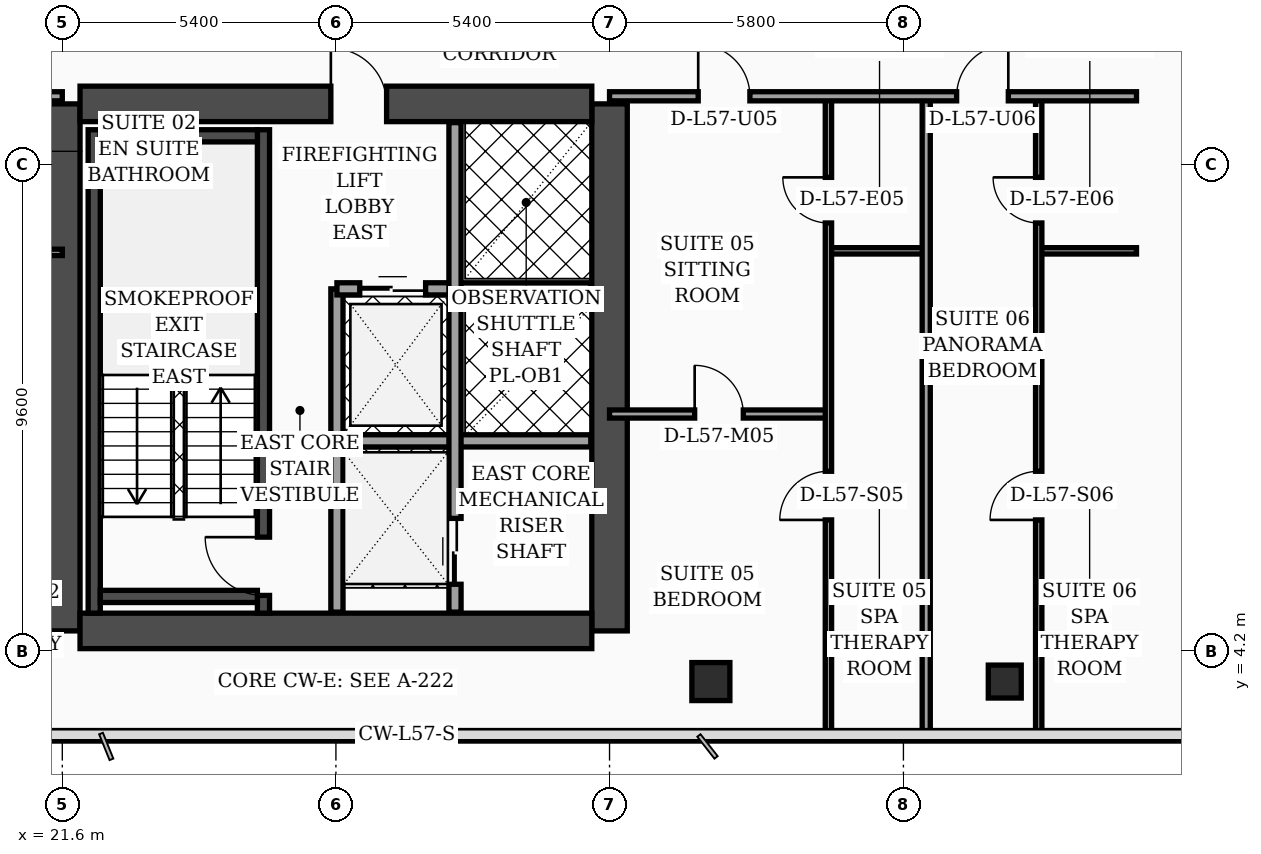
"""IFC4 building model, lengths in metres.
Left out: names, types, materials, properties, quantities, classifications, styles, units other than length and angle.
Written with IfcOpenShell. Run it as: python <this file> out.ifc"""

import sys

from ifc_helpers import new_model, si_unit, direction, frame, frame_2d, origin, origin_2d, place, context, subcontext, project, spatial, rectangle, hollow_rectangle, extrude, element, fill, save


model = new_model("IFC4")
c1 = context("Model", 3, precision=1e-05, world=origin(), true_north=direction((0.0, 1.0)))
c2 = subcontext(c1, "Body", "Model", "MODEL_VIEW")
j1 = project(units=[si_unit("LENGTHUNIT", "METRE"), si_unit("PLANEANGLEUNIT", "RADIAN")], contexts=[c1])
p1 = place(None, origin())
s1 = spatial("IfcSite", under=j1, at=p1, CompositionType="ELEMENT")
p2 = place(p1, origin())
s2 = spatial("IfcBuilding", under=s1, at=p2, CompositionType="ELEMENT")
p3 = place(p2, frame((0.0, 0.0, 230.7)))
s3 = spatial("IfcBuildingStorey", under=s2, at=p3, CompositionType="ELEMENT", Elevation=230.7)
for number, where, z_axis, x_axis in (
    (1, (21.6, 4.6, 0.0), (0.0, 0.0, 1.0), (0.0, 1.0, 0.0)),
    (2, (32.4, 4.6, 0.0), (0.0, 0.0, 1.0), (0.0, 1.0, 0.0)),
):
    element("IfcWall", number, at=place(p3, frame(where, z_axis=z_axis, x_axis=x_axis)), inside=s3, PredefinedType="SHEAR", context=c2, shape_type="SweptSolid", body=[
        extrude(rectangle(XDim=10.4, YDim=0.7, at=frame_2d((5.2, 0.0))), origin(), (0.0, 0.0, 1.0), 3.52),
    ])
p4 = place(p3, frame((21.95, 15.0, 0.0), z_axis=(0.0, 0.0, 1.0), x_axis=(1.0, 0.0, 0.0)))
e3 = element("IfcWall", 3, at=p4, inside=s3, PredefinedType="SHEAR", context=c2, shape_type="SweptSolid", body=[
    extrude(rectangle(XDim=10.1, YDim=0.7, at=frame_2d((5.05, 0.0))), origin(), (0.0, 0.0, 1.0), 3.52),
])
p5 = place(p4, frame((4.95, 0.0, 0.0)))
e4 = element("IfcOpeningElement", 4, at=p5, cuts=e3, PredefinedType="OPENING", context=c2, shape_type="SweptSolid", body=[
    extrude(rectangle(XDim=1.1, YDim=2.2, at=frame_2d((0.55, 1.1))), frame((0.0, 0.36, 0.0), z_axis=(0.0, -1.0, 0.0), x_axis=(1.0, 0.0, 0.0)), (0.0, 0.0, 1.0), 0.72),
])
p6 = place(p3, frame((21.95, 4.6, 0.0), z_axis=(0.0, 0.0, 1.0), x_axis=(1.0, 0.0, 0.0)))
e5 = element("IfcWall", 5, at=p6, inside=s3, PredefinedType="SHEAR", context=c2, shape_type="SweptSolid", body=[
    extrude(rectangle(XDim=10.1, YDim=0.7, at=frame_2d((5.05, 0.0))), origin(), (0.0, 0.0, 1.0), 3.52),
])
p7 = place(p3, frame((22.23, 4.95, 0.0), z_axis=(0.0, 0.0, 1.0), x_axis=(0.0, 1.0, 0.0)))
e6 = element("IfcWall", 6, at=p7, inside=s3, PredefinedType="SOLIDWALL", context=c2, shape_type="SweptSolid", body=[
    extrude(rectangle(XDim=9.54, YDim=0.24, at=frame_2d((4.77, 0.0))), origin(), (0.0, 0.0, 1.0), 3.52),
])
p8 = place(p3, frame((25.57, 4.95, 0.0), z_axis=(0.0, 0.0, 1.0), x_axis=(0.0, 1.0, 0.0)))
e7 = element("IfcWall", 7, at=p8, inside=s3, PredefinedType="SOLIDWALL", context=c2, shape_type="SweptSolid", body=[
    extrude(rectangle(XDim=9.54, YDim=0.24, at=frame_2d((4.77, 0.0))), origin(), (0.0, 0.0, 1.0), 3.52),
])
p9 = place(p8, frame((0.35, 0.0, 0.0)))
e8 = element("IfcOpeningElement", 8, at=p9, cuts=e7, PredefinedType="OPENING", context=c2, shape_type="SweptSolid", body=[
    extrude(rectangle(XDim=1.15, YDim=2.2, at=frame_2d((0.575, 1.1))), frame((0.0, 0.13, 0.0), z_axis=(0.0, -1.0, 0.0), x_axis=(1.0, 0.0, 0.0)), (0.0, 0.0, 1.0), 0.26),
])
for number, where, z_axis, x_axis in (
    (9, (22.35, 5.28, 0.0), (0.0, 0.0, 1.0), (1.0, 0.0, 0.0)),
    (10, (22.35, 14.37, 0.0), (0.0, 0.0, 1.0), (1.0, 0.0, 0.0)),
):
    element("IfcWall", number, at=place(p3, frame(where, z_axis=z_axis, x_axis=x_axis)), inside=s3, PredefinedType="SOLIDWALL", context=c2, shape_type="SweptSolid", body=[
        extrude(rectangle(XDim=3.1, YDim=0.24, at=frame_2d((1.55, 0.0))), origin(), (0.0, 0.0, 1.0), 3.52),
    ])
p10 = place(p3, frame((34.4, 3.6, 0.0), z_axis=(0.0, 0.0, 1.0), x_axis=(1.0, 0.0, 0.0)))
e11 = element("IfcColumn", 11, at=p10, inside=s3, PredefinedType="COLUMN", context=c2, shape_type="SweptSolid", body=[
    extrude(hollow_rectangle(XDim=0.75, YDim=0.75, WallThickness=0.032, at=origin_2d()), origin(), (0.0, 0.0, 1.0), 3.52),
])
p11 = place(p3, frame((40.2, 3.6, 0.0), z_axis=(0.0, 0.0, 1.0), x_axis=(1.0, 0.0, 0.0)))
e12 = element("IfcColumn", 12, at=p11, inside=s3, PredefinedType="COLUMN", context=c2, shape_type="SweptSolid", body=[
    extrude(hollow_rectangle(XDim=0.65, YDim=0.65, WallThickness=0.028, at=origin_2d()), origin(), (0.0, 0.0, 1.0), 3.52),
])
p12 = place(p3, frame((49.43, 5.505, 0.0), z_axis=(0.0, 0.0, 1.0), x_axis=(-0.300509063924, 0.953778958931, 0.0)))
e13 = element("IfcWall", 13, at=p12, inside=s3, PredefinedType="SOLIDWALL", context=c2, shape_type="SweptSolid", body=[
    extrude(rectangle(XDim=30.814, YDim=0.32, at=frame_2d((15.407, 0.0))), origin(), (0.0, 0.0, 1.0), 3.52),
])
p13 = place(p12, frame((18.796, 0.0, 0.0)))
e14 = element("IfcOpeningElement", 14, at=p13, cuts=e13, PredefinedType="OPENING", context=c2, shape_type="SweptSolid", body=[
    extrude(rectangle(XDim=1.4, YDim=2.25, at=frame_2d((0.7, 1.125))), frame((0.0, 0.17, 0.0), z_axis=(0.0, -1.0, 0.0), x_axis=(1.0, 0.0, 0.0)), (0.0, 0.0, 1.0), 0.34),
])
p14 = place(p12, frame((4.437, 0.0, 0.7)))
e15 = element("IfcOpeningElement", 15, at=p14, cuts=e13, PredefinedType="OPENING", context=c2, shape_type="SweptSolid", body=[
    extrude(rectangle(XDim=1.6, YDim=1.65, at=frame_2d((0.8, 0.825))), frame((0.0, 0.17, 0.0), z_axis=(0.0, -1.0, 0.0), x_axis=(1.0, 0.0, 0.0)), (0.0, 0.0, 1.0), 0.34),
])
p15 = place(p12, frame((9.889, 0.0, 0.7)))
e16 = element("IfcOpeningElement", 16, at=p15, cuts=e13, PredefinedType="OPENING", context=c2, shape_type="SweptSolid", body=[
    extrude(rectangle(XDim=1.6, YDim=1.65, at=frame_2d((0.8, 0.825))), frame((0.0, 0.17, 0.0), z_axis=(0.0, -1.0, 0.0), x_axis=(1.0, 0.0, 0.0)), (0.0, 0.0, 1.0), 0.34),
])
p16 = place(p12, frame((1.6, 0.0, 0.75)))
e17 = element("IfcOpeningElement", 17, at=p16, cuts=e13, PredefinedType="OPENING", context=c2, shape_type="SweptSolid", body=[
    extrude(rectangle(XDim=1.5, YDim=1.6, at=frame_2d((0.75, 0.8))), frame((0.0, 0.17, 0.0), z_axis=(0.0, -1.0, 0.0), x_axis=(1.0, 0.0, 0.0)), (0.0, 0.0, 1.0), 0.34),
])
p17 = place(p12, frame((7.8, 0.0, 0.75)))
e18 = element("IfcOpeningElement", 18, at=p17, cuts=e13, PredefinedType="OPENING", context=c2, shape_type="SweptSolid", body=[
    extrude(rectangle(XDim=1.5, YDim=1.6, at=frame_2d((0.75, 0.8))), frame((0.0, 0.17, 0.0), z_axis=(0.0, -1.0, 0.0), x_axis=(1.0, 0.0, 0.0)), (0.0, 0.0, 1.0), 0.34),
])
p18 = place(p12, frame((11.95, 0.0, 0.75)))
e19 = element("IfcOpeningElement", 19, at=p18, cuts=e13, PredefinedType="OPENING", context=c2, shape_type="SweptSolid", body=[
    extrude(rectangle(XDim=1.5, YDim=1.6, at=frame_2d((0.75, 0.8))), frame((0.0, 0.17, 0.0), z_axis=(0.0, -1.0, 0.0), x_axis=(1.0, 0.0, 0.0)), (0.0, 0.0, 1.0), 0.34),
])
p19 = place(p12, frame((14.0, 0.0, 0.75)))
e20 = element("IfcOpeningElement", 20, at=p19, cuts=e13, PredefinedType="OPENING", context=c2, shape_type="SweptSolid", body=[
    extrude(rectangle(XDim=1.5, YDim=1.6, at=frame_2d((0.75, 0.8))), frame((0.0, 0.17, 0.0), z_axis=(0.0, -1.0, 0.0), x_axis=(1.0, 0.0, 0.0)), (0.0, 0.0, 1.0), 0.34),
])
p20 = place(p12, frame((16.55, 0.0, 0.75)))
e21 = element("IfcOpeningElement", 21, at=p20, cuts=e13, PredefinedType="OPENING", context=c2, shape_type="SweptSolid", body=[
    extrude(rectangle(XDim=1.5, YDim=1.6, at=frame_2d((0.75, 0.8))), frame((0.0, 0.17, 0.0), z_axis=(0.0, -1.0, 0.0), x_axis=(1.0, 0.0, 0.0)), (0.0, 0.0, 1.0), 0.34),
])
p21 = place(p12, frame((20.75, 0.0, 0.75)))
e22 = element("IfcOpeningElement", 22, at=p21, cuts=e13, PredefinedType="OPENING", context=c2, shape_type="SweptSolid", body=[
    extrude(rectangle(XDim=1.5, YDim=1.6, at=frame_2d((0.75, 0.8))), frame((0.0, 0.17, 0.0), z_axis=(0.0, -1.0, 0.0), x_axis=(1.0, 0.0, 0.0)), (0.0, 0.0, 1.0), 0.34),
])
p22 = place(p12, frame((23.3, 0.0, 0.75)))
e23 = element("IfcOpeningElement", 23, at=p22, cuts=e13, PredefinedType="OPENING", context=c2, shape_type="SweptSolid", body=[
    extrude(rectangle(XDim=1.5, YDim=1.6, at=frame_2d((0.75, 0.8))), frame((0.0, 0.17, 0.0), z_axis=(0.0, -1.0, 0.0), x_axis=(1.0, 0.0, 0.0)), (0.0, 0.0, 1.0), 0.34),
])
p23 = place(p12, frame((26.4, 0.0, 0.75)))
e24 = element("IfcOpeningElement", 24, at=p23, cuts=e13, PredefinedType="OPENING", context=c2, shape_type="SweptSolid", body=[
    extrude(rectangle(XDim=1.5, YDim=1.6, at=frame_2d((0.75, 0.8))), frame((0.0, 0.17, 0.0), z_axis=(0.0, -1.0, 0.0), x_axis=(1.0, 0.0, 0.0)), (0.0, 0.0, 1.0), 0.34),
])
p24 = place(p3, frame((27.02, 4.97, 0.0), z_axis=(0.0, 0.0, 1.0), x_axis=(0.0, 1.0, 0.0)))
e25 = element("IfcWall", 25, at=p24, inside=s3, PredefinedType="SOLIDWALL", context=c2, shape_type="SweptSolid", body=[
    extrude(rectangle(XDim=6.38, YDim=0.24, at=frame_2d((3.19, 0.0))), origin(), (0.0, 0.0, 1.0), 3.52),
])
p25 = place(p3, frame((27.02, 11.35, 0.0), z_axis=(0.0, 0.0, 1.0), x_axis=(1.0, 0.0, 0.0)))
e26 = element("IfcWall", 26, at=p25, inside=s3, PredefinedType="SOLIDWALL", context=c2, shape_type="SweptSolid", body=[
    extrude(rectangle(XDim=5.01, YDim=0.24, at=frame_2d((2.505, 0.0))), origin(), (0.0, 0.0, 1.0), 3.52),
])
p26 = place(p25, frame((0.45, 0.0, 0.0)))
e27 = element("IfcOpeningElement", 27, at=p26, cuts=e26, PredefinedType="OPENING", context=c2, shape_type="SweptSolid", body=[
    extrude(rectangle(XDim=1.3, YDim=2.35, at=frame_2d((0.65, 1.175))), frame((0.0, 0.13, 0.0), z_axis=(0.0, -1.0, 0.0), x_axis=(1.0, 0.0, 0.0)), (0.0, 0.0, 1.0), 0.26),
])
p27 = place(p3, frame((27.02, 8.35, 0.0), z_axis=(0.0, 0.0, 1.0), x_axis=(1.0, 0.0, 0.0)))
e28 = element("IfcWall", 28, at=p27, inside=s3, PredefinedType="SOLIDWALL", context=c2, shape_type="SweptSolid", body=[
    extrude(rectangle(XDim=5.01, YDim=0.24, at=frame_2d((2.505, 0.0))), origin(), (0.0, 0.0, 1.0), 3.52),
])
p28 = place(p3, frame((29.35, 4.97, 0.0), z_axis=(0.0, 0.0, 1.0), x_axis=(0.0, 1.0, 0.0)))
e29 = element("IfcWall", 29, at=p28, inside=s3, PredefinedType="SOLIDWALL", context=c2, shape_type="SweptSolid", body=[
    extrude(rectangle(XDim=9.66, YDim=0.24, at=frame_2d((4.83, 0.0))), origin(), (0.0, 0.0, 1.0), 3.52),
])
p29 = place(p28, frame((0.55, 0.0, 0.0)))
e30 = element("IfcOpeningElement", 30, at=p29, cuts=e29, PredefinedType="OPENING", context=c2, shape_type="SweptSolid", body=[
    extrude(rectangle(XDim=1.3, YDim=2.35, at=frame_2d((0.65, 1.175))), frame((0.0, 0.13, 0.0), z_axis=(0.0, -1.0, 0.0), x_axis=(1.0, 0.0, 0.0)), (0.0, 0.0, 1.0), 0.26),
])
p30 = place(p3, frame((19.6, 12.07, 0.0), z_axis=(0.0, 0.0, 1.0), x_axis=(1.0, 0.0, 0.0)))
e31 = element("IfcWall", 31, at=p30, inside=s3, PredefinedType="PARTITIONING", context=c2, shape_type="SweptSolid", body=[
    extrude(rectangle(XDim=2.0, YDim=0.125, at=frame_2d((1.0, 0.0))), origin(), (0.0, 0.0, 1.0), 3.52),
])
p31 = place(p3, frame((15.15, 15.15, 0.0), z_axis=(0.0, 0.0, 1.0), x_axis=(1.0, 0.0, 0.0)))
e32 = element("IfcWall", 32, at=p31, inside=s3, PredefinedType="PARTITIONING", context=c2, shape_type="SweptSolid", body=[
    extrude(rectangle(XDim=6.45, YDim=0.18, at=frame_2d((3.225, 0.0))), origin(), (0.0, 0.0, 1.0), 2.57),
])
p32 = place(p31, frame((1.74, 0.0, 0.0)))
e33 = element("IfcOpeningElement", 33, at=p32, cuts=e32, PredefinedType="OPENING", context=c2, shape_type="SweptSolid", body=[
    extrude(rectangle(XDim=1.02, YDim=2.2, at=frame_2d((0.51, 1.1))), frame((0.0, 0.1, 0.0), z_axis=(0.0, -1.0, 0.0), x_axis=(1.0, 0.0, 0.0)), (0.0, 0.0, 1.0), 0.2),
])
p33 = place(p3, frame((36.72, 12.1, 0.0), z_axis=(0.0, 0.0, 1.0), x_axis=(1.0, 0.0, 0.0)))
e34 = element("IfcWall", 34, at=p33, inside=s3, PredefinedType="PARTITIONING", context=c2, shape_type="SweptSolid", body=[
    extrude(rectangle(XDim=1.93, YDim=0.125, at=frame_2d((0.965, 0.0))), origin(), (0.0, 0.0, 1.0), 3.52),
])
p34 = place(p3, frame((32.4, 8.88, 0.0), z_axis=(0.0, 0.0, 1.0), x_axis=(1.0, 0.0, 0.0)))
e35 = element("IfcWall", 35, at=p34, inside=s3, PredefinedType="PARTITIONING", context=c2, shape_type="SweptSolid", body=[
    extrude(rectangle(XDim=4.32, YDim=0.16, at=frame_2d((2.16, 0.0))), origin(), (0.0, 0.0, 1.0), 2.92),
])
p35 = place(p34, frame((1.68, 0.0, 0.0)))
e36 = element("IfcOpeningElement", 36, at=p35, cuts=e35, PredefinedType="OPENING", context=c2, shape_type="SweptSolid", body=[
    extrude(rectangle(XDim=0.96, YDim=2.2, at=frame_2d((0.48, 1.1))), frame((0.0, 0.09, 0.0), z_axis=(0.0, -1.0, 0.0), x_axis=(1.0, 0.0, 0.0)), (0.0, 0.0, 1.0), 0.18),
])
p36 = place(p3, frame((36.72, 2.44, 0.0), z_axis=(0.0, 0.0, 1.0), x_axis=(0.0, 1.0, 0.0)))
e37 = element("IfcWall", 37, at=p36, inside=s3, PredefinedType="PARTITIONING", context=c2, shape_type="SweptSolid", body=[
    extrude(rectangle(XDim=12.71, YDim=0.125, at=frame_2d((6.355, 0.0))), origin(), (0.0, 0.0, 1.0), 2.92),
])
p37 = place(p36, frame((4.35, 0.0, 0.0)))
e38 = element("IfcOpeningElement", 38, at=p37, cuts=e37, PredefinedType="OPENING", context=c2, shape_type="SweptSolid", body=[
    extrude(rectangle(XDim=0.96, YDim=2.2, at=frame_2d((0.48, 1.1))), frame((0.0, 0.073, 0.0), z_axis=(0.0, -1.0, 0.0), x_axis=(1.0, 0.0, 0.0)), (0.0, 0.0, 1.0), 0.145),
])
p38 = place(p36, frame((10.21, 0.0, 0.0)))
e39 = element("IfcOpeningElement", 39, at=p38, cuts=e37, PredefinedType="OPENING", context=c2, shape_type="SweptSolid", body=[
    extrude(rectangle(XDim=0.9, YDim=2.15, at=frame_2d((0.45, 1.075))), frame((0.0, 0.073, 0.0), z_axis=(0.0, -1.0, 0.0), x_axis=(1.0, 0.0, 0.0)), (0.0, 0.0, 1.0), 0.145),
])
p39 = place(p3, frame((40.87, 12.1, 0.0), z_axis=(0.0, 0.0, 1.0), x_axis=(1.0, 0.0, 0.0)))
e40 = element("IfcWall", 40, at=p39, inside=s3, PredefinedType="PARTITIONING", context=c2, shape_type="SweptSolid", body=[
    extrude(rectangle(XDim=1.93, YDim=0.125, at=frame_2d((0.965, 0.0))), origin(), (0.0, 0.0, 1.0), 3.52),
])
p40 = place(p3, frame((40.87, 2.44, 0.0), z_axis=(0.0, 0.0, 1.0), x_axis=(0.0, 1.0, 0.0)))
e41 = element("IfcWall", 41, at=p40, inside=s3, PredefinedType="PARTITIONING", context=c2, shape_type="SweptSolid", body=[
    extrude(rectangle(XDim=12.71, YDim=0.125, at=frame_2d((6.355, 0.0))), origin(), (0.0, 0.0, 1.0), 2.92),
])
p41 = place(p40, frame((4.35, 0.0, 0.0)))
e42 = element("IfcOpeningElement", 42, at=p41, cuts=e41, PredefinedType="OPENING", context=c2, shape_type="SweptSolid", body=[
    extrude(rectangle(XDim=0.96, YDim=2.2, at=frame_2d((0.48, 1.1))), frame((0.0, 0.073, 0.0), z_axis=(0.0, -1.0, 0.0), x_axis=(1.0, 0.0, 0.0)), (0.0, 0.0, 1.0), 0.145),
])
p42 = place(p40, frame((10.21, 0.0, 0.0)))
e43 = element("IfcOpeningElement", 43, at=p42, cuts=e41, PredefinedType="OPENING", context=c2, shape_type="SweptSolid", body=[
    extrude(rectangle(XDim=0.9, YDim=2.15, at=frame_2d((0.45, 1.075))), frame((0.0, 0.073, 0.0), z_axis=(0.0, -1.0, 0.0), x_axis=(1.0, 0.0, 0.0)), (0.0, 0.0, 1.0), 0.145),
])
p43 = place(p3, frame((38.65, 2.44, 0.0), z_axis=(0.0, 0.0, 1.0), x_axis=(0.0, 1.0, 0.0)))
e44 = element("IfcWall", 44, at=p43, inside=s3, PredefinedType="PARTITIONING", context=c2, shape_type="SweptSolid", body=[
    extrude(rectangle(XDim=12.71, YDim=0.16, at=frame_2d((6.355, 0.0))), origin(), (0.0, 0.0, 1.0), 2.92),
])
p44 = place(p3, frame((32.4, 15.15, 0.0), z_axis=(0.0, 0.0, 1.0), x_axis=(1.0, 0.0, 0.0)))
e45 = element("IfcWall", 45, at=p44, inside=s3, PredefinedType="PARTITIONING", context=c2, shape_type="SweptSolid", body=[
    extrude(rectangle(XDim=10.4, YDim=0.18, at=frame_2d((5.2, 0.0))), origin(), (0.0, 0.0, 1.0), 2.92),
])
p45 = place(p44, frame((1.75, 0.0, 0.0)))
e46 = element("IfcOpeningElement", 46, at=p45, cuts=e45, PredefinedType="OPENING", context=c2, shape_type="SweptSolid", body=[
    extrude(rectangle(XDim=1.02, YDim=2.2, at=frame_2d((0.51, 1.1))), frame((0.0, 0.1, 0.0), z_axis=(0.0, -1.0, 0.0), x_axis=(1.0, 0.0, 0.0)), (0.0, 0.0, 1.0), 0.2),
])
p46 = place(p44, frame((6.85, 0.0, 0.0)))
e47 = element("IfcOpeningElement", 47, at=p46, cuts=e45, PredefinedType="OPENING", context=c2, shape_type="SweptSolid", body=[
    extrude(rectangle(XDim=1.02, YDim=2.2, at=frame_2d((0.51, 1.1))), frame((0.0, 0.1, 0.0), z_axis=(0.0, -1.0, 0.0), x_axis=(1.0, 0.0, 0.0)), (0.0, 0.0, 1.0), 0.2),
])
p47 = place(p26, origin())
e48 = element("IfcDoor", 48, at=p47, inside=s3, OperationType="DOUBLE_DOOR_SLIDING", PredefinedType="DOOR", context=c2, shape_type="SweptSolid", body=[
    extrude(rectangle(XDim=1.3, YDim=2.35, at=frame_2d((0.65, 1.175))), frame((0.0, 0.025, 0.0), z_axis=(0.0, -1.0, 0.0), x_axis=(1.0, 0.0, 0.0)), (0.0, 0.0, 1.0), 0.05),
])
fill(e27, e48)
p48 = place(p29, origin())
e49 = element("IfcDoor", 49, at=p48, inside=s3, OperationType="DOUBLE_DOOR_SLIDING", PredefinedType="DOOR", context=c2, shape_type="SweptSolid", body=[
    extrude(rectangle(XDim=1.3, YDim=2.35, at=frame_2d((0.65, 1.175))), frame((0.0, 0.025, 0.0), z_axis=(0.0, -1.0, 0.0), x_axis=(1.0, 0.0, 0.0)), (0.0, 0.0, 1.0), 0.05),
])
fill(e30, e49)
p49 = place(p35, origin())
e50 = element("IfcDoor", 50, at=p49, inside=s3, OperationType="SINGLE_SWING_LEFT", PredefinedType="DOOR", context=c2, shape_type="SweptSolid", body=[
    extrude(rectangle(XDim=0.96, YDim=2.2, at=frame_2d((0.48, 1.1))), frame((0.0, 0.025, 0.0), z_axis=(0.0, -1.0, 0.0), x_axis=(1.0, 0.0, 0.0)), (0.0, 0.0, 1.0), 0.05),
])
fill(e36, e50)
p50 = place(p37, origin())
e51 = element("IfcDoor", 51, at=p50, inside=s3, OperationType="SINGLE_SWING_LEFT", PredefinedType="DOOR", context=c2, shape_type="SweptSolid", body=[
    extrude(rectangle(XDim=0.96, YDim=2.2, at=frame_2d((0.48, 1.1))), frame((0.0, 0.025, 0.0), z_axis=(0.0, -1.0, 0.0), x_axis=(1.0, 0.0, 0.0)), (0.0, 0.0, 1.0), 0.05),
])
fill(e38, e51)
p51 = place(p38, origin())
e52 = element("IfcDoor", 52, at=p51, inside=s3, OperationType="SINGLE_SWING_RIGHT", PredefinedType="DOOR", context=c2, shape_type="SweptSolid", body=[
    extrude(rectangle(XDim=0.9, YDim=2.15, at=frame_2d((0.45, 1.075))), frame((0.0, 0.025, 0.0), z_axis=(0.0, -1.0, 0.0), x_axis=(1.0, 0.0, 0.0)), (0.0, 0.0, 1.0), 0.05),
])
fill(e39, e52)
p52 = place(p41, origin())
e53 = element("IfcDoor", 53, at=p52, inside=s3, OperationType="SINGLE_SWING_LEFT", PredefinedType="DOOR", context=c2, shape_type="SweptSolid", body=[
    extrude(rectangle(XDim=0.96, YDim=2.2, at=frame_2d((0.48, 1.1))), frame((0.0, 0.025, 0.0), z_axis=(0.0, -1.0, 0.0), x_axis=(1.0, 0.0, 0.0)), (0.0, 0.0, 1.0), 0.05),
])
fill(e42, e53)
p53 = place(p42, origin())
e54 = element("IfcDoor", 54, at=p53, inside=s3, OperationType="SINGLE_SWING_RIGHT", PredefinedType="DOOR", context=c2, shape_type="SweptSolid", body=[
    extrude(rectangle(XDim=0.9, YDim=2.15, at=frame_2d((0.45, 1.075))), frame((0.0, 0.025, 0.0), z_axis=(0.0, -1.0, 0.0), x_axis=(1.0, 0.0, 0.0)), (0.0, 0.0, 1.0), 0.05),
])
fill(e43, e54)
p54 = place(p45, origin())
e55 = element("IfcDoor", 55, at=p54, inside=s3, OperationType="SINGLE_SWING_LEFT", PredefinedType="DOOR", context=c2, shape_type="SweptSolid", body=[
    extrude(rectangle(XDim=1.02, YDim=2.2, at=frame_2d((0.51, 1.1))), frame((0.0, 0.025, 0.0), z_axis=(0.0, -1.0, 0.0), x_axis=(1.0, 0.0, 0.0)), (0.0, 0.0, 1.0), 0.05),
])
fill(e46, e55)
p55 = place(p46, origin())
e56 = element("IfcDoor", 56, at=p55, inside=s3, OperationType="SINGLE_SWING_RIGHT", PredefinedType="DOOR", context=c2, shape_type="SweptSolid", body=[
    extrude(rectangle(XDim=1.02, YDim=2.2, at=frame_2d((0.51, 1.1))), frame((0.0, 0.025, 0.0), z_axis=(0.0, -1.0, 0.0), x_axis=(1.0, 0.0, 0.0)), (0.0, 0.0, 1.0), 0.05),
])
fill(e47, e56)
p56 = place(p9, origin())
e57 = element("IfcDoor", 57, at=p56, inside=s3, OperationType="SINGLE_SWING_RIGHT", PredefinedType="DOOR", context=c2, shape_type="SweptSolid", body=[
    extrude(rectangle(XDim=1.15, YDim=2.2, at=frame_2d((0.575, 1.1))), frame((0.0, 0.025, 0.0), z_axis=(0.0, -1.0, 0.0), x_axis=(1.0, 0.0, 0.0)), (0.0, 0.0, 1.0), 0.05),
])
fill(e8, e57)
p57 = place(p5, origin())
e58 = element("IfcDoor", 58, at=p57, inside=s3, OperationType="SINGLE_SWING_LEFT", PredefinedType="DOOR", context=c2, shape_type="SweptSolid", body=[
    extrude(rectangle(XDim=1.1, YDim=2.2, at=frame_2d((0.55, 1.1))), frame((0.0, 0.025, 0.0), z_axis=(0.0, -1.0, 0.0), x_axis=(1.0, 0.0, 0.0)), (0.0, 0.0, 1.0), 0.05),
])
fill(e4, e58)
save(model, sys.argv[1])
